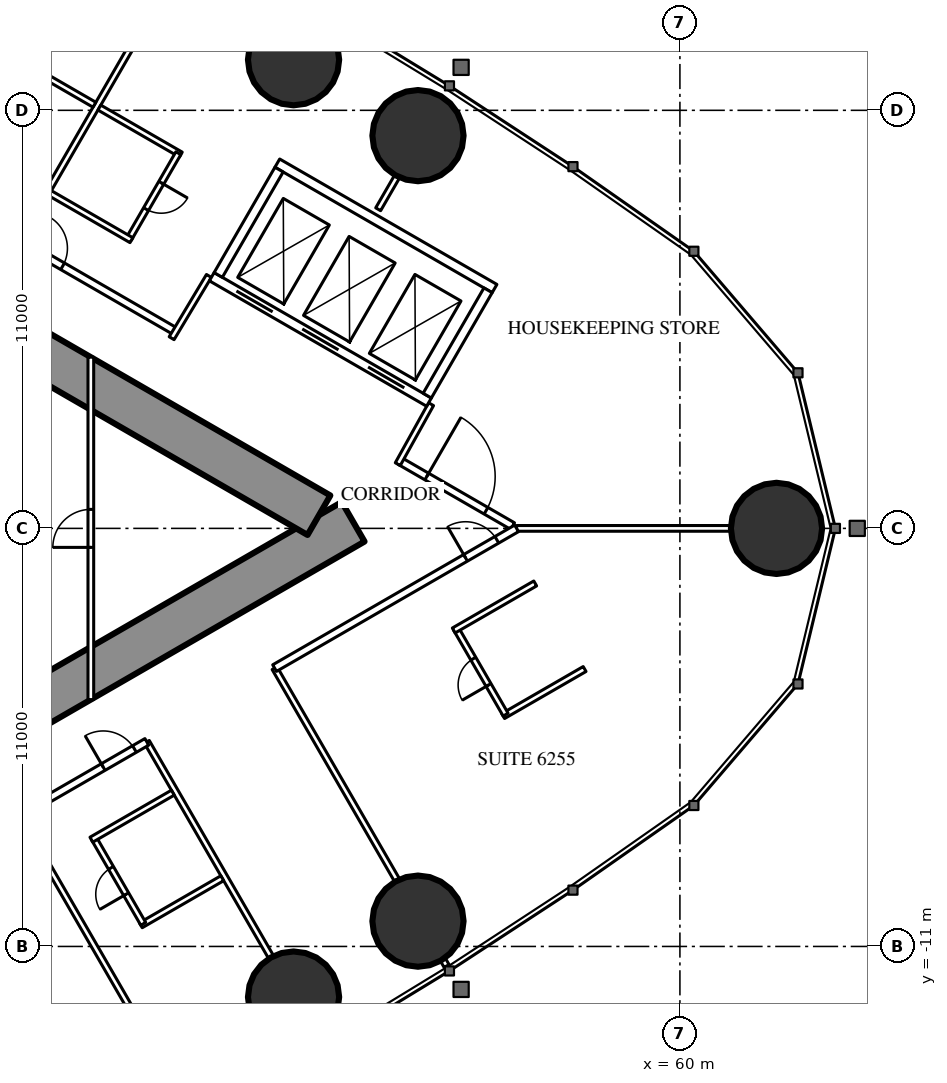
"""IFC4 building model, lengths in metres.
Left out: names, types, materials, properties, quantities, classifications, styles, units other than length and angle.
Written with IfcOpenShell. Run it as: python <this file> out.ifc"""

import sys

from ifc_helpers import new_model, si_unit, direction, frame, frame_2d, origin, origin_2d, place, context, subcontext, project, spatial, rectangle, circle, extrude, element, fill, save


model = new_model("IFC4")
c1 = context("Model", 3, precision=1e-05, world=origin(), true_north=direction((0.0, 1.0)))
c2 = subcontext(c1, "Body", "Model", "MODEL_VIEW")
j1 = project(units=[si_unit("LENGTHUNIT", "METRE"), si_unit("PLANEANGLEUNIT", "RADIAN")], contexts=[c1])
p1 = place(None, origin())
s1 = spatial("IfcSite", under=j1, at=p1, CompositionType="ELEMENT")
p2 = place(p1, origin())
s2 = spatial("IfcBuilding", under=s1, at=p2, CompositionType="ELEMENT")
p3 = place(p2, frame((0.0, 0.0, 233.3)))
s3 = spatial("IfcBuildingStorey", under=s2, at=p3, CompositionType="ELEMENT", Elevation=233.3)
for number, where, z_axis, x_axis in (
    (1, (62.542, 0.0, 0.0), (0.0, 0.0, 1.0), (1.0, 0.0, 0.0)),
    (2, (53.108, 10.334, 0.0), (0.0, 0.0, 1.0), (1.0, 0.0, 0.0)),
    (3, (49.834, 12.332, 0.0), (0.0, 0.0, 1.0), (1.0, 0.0, 0.0)),
    (4, (49.834, -12.332, 0.0), (0.0, 0.0, 1.0), (1.0, 0.0, 0.0)),
    (5, (53.108, -10.334, 0.0), (0.0, 0.0, 1.0), (1.0, 0.0, 0.0)),
):
    element("IfcColumn", number, at=place(p3, frame(where, z_axis=z_axis, x_axis=x_axis)), inside=s3, PredefinedType="COLUMN", context=c2, shape_type="SweptSolid", body=[
        extrude(circle(Radius=1.2, at=origin_2d()), origin(), (0.0, 0.0, 1.0), 3.6),
    ])
p4 = place(p3, frame((27.2, -13.8, 0.0), z_axis=(0.0, 0.0, 1.0), x_axis=(0.866027159892, 0.499996958321, 0.0)))
e6 = element("IfcWall", 6, at=p4, inside=s3, PredefinedType="SHEAR", context=c2, shape_type="SweptSolid", body=[
    extrude(rectangle(XDim=27.947, YDim=1.2, at=frame_2d((13.973, 0.0))), origin(), (0.0, 0.0, 1.0), 3.6),
])
p5 = place(p4, frame((4.6, 0.0, 0.0)))
e7 = element("IfcOpeningElement", 7, at=p5, cuts=e6, PredefinedType="OPENING", context=c2, shape_type="SweptSolid", body=[
    extrude(rectangle(XDim=1.0, YDim=2.2, at=frame_2d((0.5, 1.1))), frame((0.0, 0.61, 0.0), z_axis=(0.0, -1.0, 0.0), x_axis=(1.0, 0.0, 0.0)), (0.0, 0.0, 1.0), 1.22),
])
p6 = place(p4, frame((13.395, 0.0, 0.0)))
e8 = element("IfcOpeningElement", 8, at=p6, cuts=e6, PredefinedType="OPENING", context=c2, shape_type="SweptSolid", body=[
    extrude(rectangle(XDim=1.8, YDim=2.2, at=frame_2d((0.9, 1.1))), frame((0.0, 0.61, 0.0), z_axis=(0.0, -1.0, 0.0), x_axis=(1.0, 0.0, 0.0)), (0.0, 0.0, 1.0), 1.22),
])
p7 = place(p3, frame((27.2, 13.8, 0.0), z_axis=(0.0, 0.0, 1.0), x_axis=(0.866024515034, -0.500001539357, 0.0)))
e9 = element("IfcWall", 9, at=p7, inside=s3, PredefinedType="SHEAR", context=c2, shape_type="SweptSolid", body=[
    extrude(rectangle(XDim=26.907, YDim=1.2, at=frame_2d((13.454, 0.0))), origin(), (0.0, 0.0, 1.0), 3.6),
])
p8 = place(p7, frame((4.6, 0.0, 0.0)))
e10 = element("IfcOpeningElement", 10, at=p8, cuts=e9, PredefinedType="OPENING", context=c2, shape_type="SweptSolid", body=[
    extrude(rectangle(XDim=1.0, YDim=2.2, at=frame_2d((0.5, 1.1))), frame((0.0, 0.61, 0.0), z_axis=(0.0, -1.0, 0.0), x_axis=(1.0, 0.0, 0.0)), (0.0, 0.0, 1.0), 1.22),
])
p9 = place(p7, frame((13.395, 0.0, 0.0)))
e11 = element("IfcOpeningElement", 11, at=p9, cuts=e9, PredefinedType="OPENING", context=c2, shape_type="SweptSolid", body=[
    extrude(rectangle(XDim=1.8, YDim=2.2, at=frame_2d((0.9, 1.1))), frame((0.0, 0.61, 0.0), z_axis=(0.0, -1.0, 0.0), x_axis=(1.0, 0.0, 0.0)), (0.0, 0.0, 1.0), 1.22),
])
p10 = place(p3, frame((42.66, -7.646, 0.0), z_axis=(0.0, 0.0, 1.0), x_axis=(0.499996592859, -0.866027370889, 0.0)))
e12 = element("IfcWall", 12, at=p10, inside=s3, PredefinedType="PARTITIONING", context=c2, shape_type="SweptSolid", body=[
    extrude(rectangle(XDim=6.398, YDim=0.15, at=frame_2d((3.199, 0.0))), origin(), (0.0, 0.0, 1.0), 2.45),
])
p11 = place(p3, frame((45.973, -5.617, 0.0), z_axis=(0.0, 0.0, 1.0), x_axis=(0.499985856986, -0.866033569104, 0.0)))
e13 = element("IfcWall", 13, at=p11, inside=s3, PredefinedType="PARTITIONING", context=c2, shape_type="SweptSolid", body=[
    extrude(rectangle(XDim=6.526, YDim=0.15, at=frame_2d((3.263, 0.0))), origin(), (0.0, 0.0, 1.0), 2.45),
])
p12 = place(p3, frame((49.335, -3.676, 0.0), z_axis=(0.0, 0.0, 1.0), x_axis=(0.500000613642, -0.866025049498, 0.0)))
e14 = element("IfcWall", 14, at=p12, inside=s3, PredefinedType="PARTITIONING", context=c2, shape_type="SweptSolid", body=[
    extrude(rectangle(XDim=6.433, YDim=0.15, at=frame_2d((3.216, 0.0))), origin(), (0.0, 0.0, 1.0), 2.45),
])
p13 = place(p3, frame((53.771, -11.36, 0.0), z_axis=(0.0, 0.0, 1.0), x_axis=(0.499524978789, -0.866299483762, 0.0)))
e15 = element("IfcWall", 15, at=p13, inside=s3, PredefinedType="PARTITIONING", context=c2, shape_type="SweptSolid", body=[
    extrude(rectangle(XDim=0.178, YDim=0.15, at=frame_2d((0.089, 0.0))), origin(), (0.0, 0.0, 1.0), 2.45),
])
p14 = place(p3, frame((42.66, 7.646, 0.0), z_axis=(0.0, 0.0, 1.0), x_axis=(0.499996592859, 0.866027370889, 0.0)))
e16 = element("IfcWall", 16, at=p14, inside=s3, PredefinedType="PARTITIONING", context=c2, shape_type="SweptSolid", body=[
    extrude(rectangle(XDim=6.398, YDim=0.15, at=frame_2d((3.199, 0.0))), origin(), (0.0, 0.0, 1.0), 2.45),
])
p15 = place(p3, frame((55.702, 0.0, 0.0), z_axis=(0.0, 0.0, 1.0), x_axis=(1.0, 0.0, 0.0)))
e17 = element("IfcWall", 17, at=p15, inside=s3, PredefinedType="PARTITIONING", context=c2, shape_type="SweptSolid", body=[
    extrude(rectangle(XDim=5.619, YDim=0.15, at=frame_2d((2.81, 0.0))), origin(), (0.0, 0.0, 1.0), 2.45),
])
p16 = place(p3, frame((52.06, 8.396, 0.0), z_axis=(0.0, 0.0, 1.0), x_axis=(0.500095379624, 0.865970329329, 0.0)))
e18 = element("IfcWall", 18, at=p16, inside=s3, PredefinedType="PARTITIONING", context=c2, shape_type="SweptSolid", body=[
    extrude(rectangle(XDim=0.982, YDim=0.15, at=frame_2d((0.491, 0.0))), origin(), (0.0, 0.0, 1.0), 3.35),
])
p17 = place(p3, frame((28.959, 15.44, 0.0), z_axis=(0.0, 0.0, 1.0), x_axis=(0.866028936079, -0.499993881836, 0.0)))
e19 = element("IfcWall", 19, at=p17, inside=s3, PredefinedType="PARTITIONING", context=c2, shape_type="SweptSolid", body=[
    extrude(rectangle(XDim=20.503, YDim=0.2, at=frame_2d((10.251, 0.0))), origin(), (0.0, 0.0, 1.0), 3.35),
])
p18 = place(p17, frame((16.137, 0.0, 0.0)))
e20 = element("IfcOpeningElement", 20, at=p18, cuts=e19, PredefinedType="OPENING", context=c2, shape_type="SweptSolid", body=[
    extrude(rectangle(XDim=0.95, YDim=2.2, at=frame_2d((0.475, 1.1))), frame((0.0, 0.11, 0.0), z_axis=(0.0, -1.0, 0.0), x_axis=(1.0, 0.0, 0.0)), (0.0, 0.0, 1.0), 0.22),
])
p19 = place(p17, frame((14.437, 0.0, 0.0)))
e21 = element("IfcOpeningElement", 21, at=p19, cuts=e19, PredefinedType="OPENING", context=c2, shape_type="SweptSolid", body=[
    extrude(rectangle(XDim=0.95, YDim=2.2, at=frame_2d((0.475, 1.1))), frame((0.0, 0.11, 0.0), z_axis=(0.0, -1.0, 0.0), x_axis=(1.0, 0.0, 0.0)), (0.0, 0.0, 1.0), 0.22),
])
p20 = place(p17, frame((2.244, 0.0, 0.0)))
e22 = element("IfcOpeningElement", 22, at=p20, cuts=e19, PredefinedType="OPENING", context=c2, shape_type="SweptSolid", body=[
    extrude(rectangle(XDim=1.8, YDim=2.03, at=frame_2d((0.9, 1.015))), frame((0.0, 0.11, 0.0), z_axis=(0.0, -1.0, 0.0), x_axis=(1.0, 0.0, 0.0)), (0.0, 0.0, 1.0), 0.22),
])
p21 = place(p3, frame((52.639, 1.769, 0.0), z_axis=(0.0, 0.0, 1.0), x_axis=(0.866027340901, -0.4999966448, 0.0)))
e23 = element("IfcWall", 23, at=p21, inside=s3, PredefinedType="PARTITIONING", context=c2, shape_type="SweptSolid", body=[
    extrude(rectangle(XDim=3.417, YDim=0.2, at=frame_2d((1.708, 0.0))), origin(), (0.0, 0.0, 1.0), 3.35),
])
p22 = place(p21, frame((0.809, 0.0, 0.0)))
e24 = element("IfcOpeningElement", 24, at=p22, cuts=e23, PredefinedType="OPENING", context=c2, shape_type="SweptSolid", body=[
    extrude(rectangle(XDim=1.8, YDim=2.2, at=frame_2d((0.9, 1.1))), frame((0.0, 0.11, 0.0), z_axis=(0.0, -1.0, 0.0), x_axis=(1.0, 0.0, 0.0)), (0.0, 0.0, 1.0), 0.22),
])
p23 = place(p3, frame((47.606, 6.642, 0.0), z_axis=(0.0, 0.0, 1.0), x_axis=(-0.51353662755, -0.858067673418, 0.0)))
e25 = element("IfcWall", 25, at=p23, inside=s3, PredefinedType="PARTITIONING", context=c2, shape_type="SweptSolid", body=[
    extrude(rectangle(XDim=1.91, YDim=0.15, at=frame_2d((0.955, 0.0))), origin(), (0.0, 0.0, 1.0), 3.35),
])
p24 = place(p3, frame((52.576, 1.689, 0.0), z_axis=(0.0, 0.0, 1.0), x_axis=(0.485424724123, 0.874278466629, 0.0)))
e26 = element("IfcWall", 26, at=p24, inside=s3, PredefinedType="PARTITIONING", context=c2, shape_type="SweptSolid", body=[
    extrude(rectangle(XDim=1.805, YDim=0.15, at=frame_2d((0.903, 0.0))), origin(), (0.0, 0.0, 1.0), 3.35),
])
p25 = place(p3, frame((45.814, -10.443, 0.0), z_axis=(0.0, 0.0, 1.0), x_axis=(0.866073894602, 0.499916002032, 0.0)))
e27 = element("IfcWall", 27, at=p25, inside=s3, PredefinedType="PARTITIONING", context=c2, shape_type="SweptSolid", body=[
    extrude(rectangle(XDim=2.475, YDim=0.15, at=frame_2d((1.238, 0.0))), origin(), (0.0, 0.0, 1.0), 3.35),
])
p26 = place(p3, frame((44.579, -8.154, 0.0), z_axis=(0.0, 0.0, 1.0), x_axis=(0.500006934395, -0.866021400173, 0.0)))
e28 = element("IfcWall", 28, at=p26, inside=s3, PredefinedType="PARTITIONING", context=c2, shape_type="SweptSolid", body=[
    extrude(rectangle(XDim=2.6, YDim=0.15, at=frame_2d((1.3, 0.0))), origin(), (0.0, 0.0, 1.0), 3.35),
])
p27 = place(p26, frame((0.9, 0.0, 0.0)))
e29 = element("IfcOpeningElement", 29, at=p27, cuts=e28, PredefinedType="OPENING", context=c2, shape_type="SweptSolid", body=[
    extrude(rectangle(XDim=0.8, YDim=2.2, at=frame_2d((0.4, 1.1))), frame((0.0, 0.085, 0.0), z_axis=(0.0, -1.0, 0.0), x_axis=(1.0, 0.0, 0.0)), (0.0, 0.0, 1.0), 0.17),
])
p28 = place(p3, frame((44.514, -8.191, 0.0), z_axis=(0.0, 0.0, 1.0), x_axis=(0.866031185235, 0.4999899861, 0.0)))
e30 = element("IfcWall", 30, at=p28, inside=s3, PredefinedType="PARTITIONING", context=c2, shape_type="SweptSolid", body=[
    extrude(rectangle(XDim=2.475, YDim=0.15, at=frame_2d((1.238, 0.0))), origin(), (0.0, 0.0, 1.0), 3.35),
])
p29 = place(p3, frame((55.349, -4.938, 0.0), z_axis=(0.0, 0.0, 1.0), x_axis=(0.866006523861, 0.500032699561, 0.0)))
e31 = element("IfcWall", 31, at=p29, inside=s3, PredefinedType="PARTITIONING", context=c2, shape_type="SweptSolid", body=[
    extrude(rectangle(XDim=2.475, YDim=0.15, at=frame_2d((1.237, 0.0))), origin(), (0.0, 0.0, 1.0), 3.35),
])
p30 = place(p3, frame((54.114, -2.649, 0.0), z_axis=(0.0, 0.0, 1.0), x_axis=(0.500006934395, -0.866021400173, 0.0)))
e32 = element("IfcWall", 32, at=p30, inside=s3, PredefinedType="PARTITIONING", context=c2, shape_type="SweptSolid", body=[
    extrude(rectangle(XDim=2.6, YDim=0.15, at=frame_2d((1.3, 0.0))), origin(), (0.0, 0.0, 1.0), 3.35),
])
p31 = place(p30, frame((0.9, 0.0, 0.0)))
e33 = element("IfcOpeningElement", 33, at=p31, cuts=e32, PredefinedType="OPENING", context=c2, shape_type="SweptSolid", body=[
    extrude(rectangle(XDim=0.8, YDim=2.2, at=frame_2d((0.4, 1.1))), frame((0.0, 0.085, 0.0), z_axis=(0.0, -1.0, 0.0), x_axis=(1.0, 0.0, 0.0)), (0.0, 0.0, 1.0), 0.17),
])
for number, where, z_axis, x_axis in (
    (34, (54.049, -2.687, 0.0), (0.0, 0.0, 1.0), (0.866, 0.5, 0.0)),
    (35, (44.725, 11.072, 0.0), (0.0, 0.0, 1.0), (0.866, -0.5, 0.0)),
):
    element("IfcWall", number, at=place(p3, frame(where, z_axis=z_axis, x_axis=x_axis)), inside=s3, PredefinedType="PARTITIONING", context=c2, shape_type="SweptSolid", body=[
        extrude(rectangle(XDim=2.475, YDim=0.15, at=frame_2d((1.237, 0.0))), origin(), (0.0, 0.0, 1.0), 3.35),
    ])
p32 = place(p3, frame((45.503, 7.621, 0.0), z_axis=(0.0, 0.0, 1.0), x_axis=(0.500006934395, 0.866021400173, 0.0)))
e36 = element("IfcWall", 36, at=p32, inside=s3, PredefinedType="PARTITIONING", context=c2, shape_type="SweptSolid", body=[
    extrude(rectangle(XDim=2.6, YDim=0.15, at=frame_2d((1.3, 0.0))), origin(), (0.0, 0.0, 1.0), 3.35),
])
p33 = place(p32, frame((0.9, 0.0, 0.0)))
e37 = element("IfcOpeningElement", 37, at=p33, cuts=e36, PredefinedType="OPENING", context=c2, shape_type="SweptSolid", body=[
    extrude(rectangle(XDim=0.8, YDim=2.2, at=frame_2d((0.4, 1.1))), frame((0.0, 0.085, 0.0), z_axis=(0.0, -1.0, 0.0), x_axis=(1.0, 0.0, 0.0)), (0.0, 0.0, 1.0), 0.17),
])
p34 = place(p3, frame((43.425, 8.821, 0.0), z_axis=(0.0, 0.0, 1.0), x_axis=(0.866006523861, -0.500032699561, 0.0)))
e38 = element("IfcWall", 38, at=p34, inside=s3, PredefinedType="PARTITIONING", context=c2, shape_type="SweptSolid", body=[
    extrude(rectangle(XDim=2.475, YDim=0.15, at=frame_2d((1.237, 0.0))), origin(), (0.0, 0.0, 1.0), 2.5),
])
p35 = place(p3, frame((42.451, 12.385, 0.0), z_axis=(0.0, 0.0, 1.0), x_axis=(0.866031185235, -0.4999899861, 0.0)))
e39 = element("IfcWall", 39, at=p35, inside=s3, PredefinedType="PARTITIONING", context=c2, shape_type="SweptSolid", body=[
    extrude(rectangle(XDim=2.475, YDim=0.15, at=frame_2d((1.238, 0.0))), origin(), (0.0, 0.0, 1.0), 3.35),
])
p36 = place(p3, frame((28.959, -15.44, 0.0), z_axis=(0.0, 0.0, 1.0), x_axis=(0.866025204199, 0.500000345692, 0.0)))
e40 = element("IfcWall", 40, at=p36, inside=s3, PredefinedType="PARTITIONING", context=c2, shape_type="SweptSolid", body=[
    extrude(rectangle(XDim=19.646, YDim=0.2, at=frame_2d((9.823, 0.0))), origin(), (0.0, 0.0, 1.0), 3.35),
])
p37 = place(p36, frame((1.494, 0.0, 0.0)))
e41 = element("IfcOpeningElement", 41, at=p37, cuts=e40, PredefinedType="OPENING", context=c2, shape_type="SweptSolid", body=[
    extrude(rectangle(XDim=1.8, YDim=2.03, at=frame_2d((0.9, 1.015))), frame((0.0, 0.11, 0.0), z_axis=(0.0, -1.0, 0.0), x_axis=(1.0, 0.0, 0.0)), (0.0, 0.0, 1.0), 0.22),
])
p38 = place(p36, frame((7.687, 0.0, 0.0)))
e42 = element("IfcOpeningElement", 42, at=p38, cuts=e40, PredefinedType="OPENING", context=c2, shape_type="SweptSolid", body=[
    extrude(rectangle(XDim=1.0, YDim=2.2, at=frame_2d((0.5, 1.1))), frame((0.0, 0.11, 0.0), z_axis=(0.0, -1.0, 0.0), x_axis=(1.0, 0.0, 0.0)), (0.0, 0.0, 1.0), 0.22),
])
p39 = place(p36, frame((18.321, 0.0, 0.0)))
e43 = element("IfcOpeningElement", 43, at=p39, cuts=e40, PredefinedType="OPENING", context=c2, shape_type="SweptSolid", body=[
    extrude(rectangle(XDim=0.95, YDim=2.2, at=frame_2d((0.475, 1.1))), frame((0.0, 0.11, 0.0), z_axis=(0.0, -1.0, 0.0), x_axis=(1.0, 0.0, 0.0)), (0.0, 0.0, 1.0), 0.22),
])
p40 = place(p3, frame((49.335, -3.676, 0.0), z_axis=(0.0, 0.0, 1.0), x_axis=(0.866021344046, 0.500007031608, 0.0)))
e44 = element("IfcWall", 44, at=p40, inside=s3, PredefinedType="PARTITIONING", context=c2, shape_type="SweptSolid", body=[
    extrude(rectangle(XDim=7.352, YDim=0.2, at=frame_2d((3.676, 0.0))), origin(), (0.0, 0.0, 1.0), 3.35),
])
p41 = place(p40, frame((5.802, 0.0, 0.0)))
e45 = element("IfcOpeningElement", 45, at=p41, cuts=e44, PredefinedType="OPENING", context=c2, shape_type="SweptSolid", body=[
    extrude(rectangle(XDim=0.95, YDim=2.2, at=frame_2d((0.475, 1.1))), frame((0.0, 0.11, 0.0), z_axis=(0.0, -1.0, 0.0), x_axis=(1.0, 0.0, 0.0)), (0.0, 0.0, 1.0), 0.22),
])
p42 = place(p3, frame((44.5, -4.505, 0.0), z_axis=(0.0, 0.0, 1.0), x_axis=(0.0, 1.0, 0.0)))
e46 = element("IfcWall", 46, at=p42, inside=s3, PredefinedType="PARTITIONING", context=c2, shape_type="SweptSolid", body=[
    extrude(rectangle(XDim=9.009, YDim=0.15, at=frame_2d((4.505, 0.0))), origin(), (0.0, 0.0, 1.0), 3.35),
])
p43 = place(p42, frame((4.005, 0.0, 0.0)))
e47 = element("IfcOpeningElement", 47, at=p43, cuts=e46, PredefinedType="OPENING", context=c2, shape_type="SweptSolid", body=[
    extrude(rectangle(XDim=1.0, YDim=2.2, at=frame_2d((0.5, 1.1))), frame((0.0, 0.085, 0.0), z_axis=(0.0, -1.0, 0.0), x_axis=(1.0, 0.0, 0.0)), (0.0, 0.0, 1.0), 0.17),
])
p44 = place(p3, frame((47.681, 6.622, 0.0), z_axis=(0.0, 0.0, 1.0), x_axis=(0.86603344179, -0.499986077507, 0.0)))
e48 = element("IfcWall", 48, at=p44, inside=s3, PredefinedType="PARTITIONING", context=c2, shape_type="SweptSolid", body=[
    extrude(rectangle(XDim=6.6, YDim=0.25, at=frame_2d((3.3, 0.0))), origin(), (0.0, 0.0, 1.0), 3.35),
])
p45 = place(p44, frame((0.75, 0.0, 0.0)))
e49 = element("IfcOpeningElement", 49, at=p45, cuts=e48, PredefinedType="OPENING", context=c2, shape_type="SweptSolid", body=[
    extrude(rectangle(XDim=1.1, YDim=2.2, at=frame_2d((0.55, 1.1))), frame((0.0, 0.135, 0.0), z_axis=(0.0, -1.0, 0.0), x_axis=(1.0, 0.0, 0.0)), (0.0, 0.0, 1.0), 0.27),
])
p46 = place(p44, frame((2.75, 0.0, 0.0)))
e50 = element("IfcOpeningElement", 50, at=p46, cuts=e48, PredefinedType="OPENING", context=c2, shape_type="SweptSolid", body=[
    extrude(rectangle(XDim=1.1, YDim=2.2, at=frame_2d((0.55, 1.1))), frame((0.0, 0.135, 0.0), z_axis=(0.0, -1.0, 0.0), x_axis=(1.0, 0.0, 0.0)), (0.0, 0.0, 1.0), 0.27),
])
p47 = place(p44, frame((4.75, 0.0, 0.0)))
e51 = element("IfcOpeningElement", 51, at=p47, cuts=e48, PredefinedType="OPENING", context=c2, shape_type="SweptSolid", body=[
    extrude(rectangle(XDim=1.1, YDim=2.2, at=frame_2d((0.55, 1.1))), frame((0.0, 0.135, 0.0), z_axis=(0.0, -1.0, 0.0), x_axis=(1.0, 0.0, 0.0)), (0.0, 0.0, 1.0), 0.27),
])
p48 = place(p3, frame((49.406, 9.611, 0.0), z_axis=(0.0, 0.0, 1.0), x_axis=(0.86603344179, -0.499986077507, 0.0)))
e52 = element("IfcWall", 52, at=p48, inside=s3, PredefinedType="PARTITIONING", context=c2, shape_type="SweptSolid", body=[
    extrude(rectangle(XDim=6.6, YDim=0.25, at=frame_2d((3.3, 0.0))), origin(), (0.0, 0.0, 1.0), 3.35),
])
p49 = place(p3, frame((47.852, 6.668, 0.0), z_axis=(0.0, 0.0, 1.0), x_axis=(0.499929347863, 0.866066190972, 0.0)))
e53 = element("IfcWall", 53, at=p49, inside=s3, PredefinedType="PARTITIONING", context=c2, shape_type="SweptSolid", body=[
    extrude(rectangle(XDim=3.201, YDim=0.25, at=frame_2d((1.6, 0.0))), origin(), (0.0, 0.0, 1.0), 3.35),
])
p50 = place(p3, frame((53.352, 3.493, 0.0), z_axis=(0.0, 0.0, 1.0), x_axis=(0.499872130319, 0.866099216793, 0.0)))
e54 = element("IfcWall", 54, at=p50, inside=s3, PredefinedType="PARTITIONING", context=c2, shape_type="SweptSolid", body=[
    extrude(rectangle(XDim=3.2, YDim=0.25, at=frame_2d((1.6, 0.0))), origin(), (0.0, 0.0, 1.0), 3.35),
])
p51 = place(p27, origin())
e55 = element("IfcDoor", 55, at=p51, inside=s3, OperationType="SINGLE_SWING_RIGHT", PredefinedType="DOOR", context=c2, shape_type="SweptSolid", body=[
    extrude(rectangle(XDim=0.8, YDim=2.2, at=frame_2d((0.4, 1.1))), frame((0.0, 0.025, 0.0), z_axis=(0.0, -1.0, 0.0), x_axis=(1.0, 0.0, 0.0)), (0.0, 0.0, 1.0), 0.05),
])
fill(e29, e55)
p52 = place(p39, origin())
e56 = element("IfcDoor", 56, at=p52, inside=s3, OperationType="SINGLE_SWING_LEFT", PredefinedType="DOOR", context=c2, shape_type="SweptSolid", body=[
    extrude(rectangle(XDim=0.95, YDim=2.2, at=frame_2d((0.475, 1.1))), frame((0.0, 0.025, 0.0), z_axis=(0.0, -1.0, 0.0), x_axis=(1.0, 0.0, 0.0)), (0.0, 0.0, 1.0), 0.05),
])
fill(e43, e56)
p53 = place(p31, origin())
e57 = element("IfcDoor", 57, at=p53, inside=s3, OperationType="SINGLE_SWING_RIGHT", PredefinedType="DOOR", context=c2, shape_type="SweptSolid", body=[
    extrude(rectangle(XDim=0.8, YDim=2.2, at=frame_2d((0.4, 1.1))), frame((0.0, 0.025, 0.0), z_axis=(0.0, -1.0, 0.0), x_axis=(1.0, 0.0, 0.0)), (0.0, 0.0, 1.0), 0.05),
])
fill(e33, e57)
p54 = place(p41, origin())
e58 = element("IfcDoor", 58, at=p54, inside=s3, OperationType="SINGLE_SWING_LEFT", PredefinedType="DOOR", context=c2, shape_type="SweptSolid", body=[
    extrude(rectangle(XDim=0.95, YDim=2.2, at=frame_2d((0.475, 1.1))), frame((0.0, 0.025, 0.0), z_axis=(0.0, -1.0, 0.0), x_axis=(1.0, 0.0, 0.0)), (0.0, 0.0, 1.0), 0.05),
])
fill(e45, e58)
p55 = place(p33, origin())
e59 = element("IfcDoor", 59, at=p55, inside=s3, OperationType="SINGLE_SWING_RIGHT", PredefinedType="DOOR", context=c2, shape_type="SweptSolid", body=[
    extrude(rectangle(XDim=0.8, YDim=2.2, at=frame_2d((0.4, 1.1))), frame((0.0, 0.025, 0.0), z_axis=(0.0, -1.0, 0.0), x_axis=(1.0, 0.0, 0.0)), (0.0, 0.0, 1.0), 0.05),
])
fill(e37, e59)
p56 = place(p18, origin())
e60 = element("IfcDoor", 60, at=p56, inside=s3, OperationType="SINGLE_SWING_LEFT", PredefinedType="DOOR", context=c2, shape_type="SweptSolid", body=[
    extrude(rectangle(XDim=0.95, YDim=2.2, at=frame_2d((0.475, 1.1))), frame((0.0, 0.025, 0.0), z_axis=(0.0, -1.0, 0.0), x_axis=(1.0, 0.0, 0.0)), (0.0, 0.0, 1.0), 0.05),
])
fill(e20, e60)
p57 = place(p22, origin())
e61 = element("IfcDoor", 61, at=p57, inside=s3, OperationType="DOUBLE_DOOR_SINGLE_SWING", PredefinedType="DOOR", context=c2, shape_type="SweptSolid", body=[
    extrude(rectangle(XDim=1.8, YDim=2.2, at=frame_2d((0.9, 1.1))), frame((0.0, 0.025, 0.0), z_axis=(0.0, -1.0, 0.0), x_axis=(1.0, 0.0, 0.0)), (0.0, 0.0, 1.0), 0.05),
])
fill(e24, e61)
p58 = place(p43, origin())
e62 = element("IfcDoor", 62, at=p58, inside=s3, OperationType="SINGLE_SWING_LEFT", PredefinedType="DOOR", context=c2, shape_type="SweptSolid", body=[
    extrude(rectangle(XDim=1.0, YDim=2.2, at=frame_2d((0.5, 1.1))), frame((0.0, 0.025, 0.0), z_axis=(0.0, -1.0, 0.0), x_axis=(1.0, 0.0, 0.0)), (0.0, 0.0, 1.0), 0.05),
])
fill(e47, e62)
p59 = place(p45, origin())
e63 = element("IfcDoor", 63, at=p59, inside=s3, OperationType="DOUBLE_DOOR_SLIDING", PredefinedType="USERDEFINED", context=c2, shape_type="SweptSolid", body=[
    extrude(rectangle(XDim=1.1, YDim=2.2, at=frame_2d((0.55, 1.1))), frame((0.0, 0.025, 0.0), z_axis=(0.0, -1.0, 0.0), x_axis=(1.0, 0.0, 0.0)), (0.0, 0.0, 1.0), 0.05),
])
fill(e49, e63)
p60 = place(p46, origin())
e64 = element("IfcDoor", 64, at=p60, inside=s3, OperationType="DOUBLE_DOOR_SLIDING", PredefinedType="USERDEFINED", context=c2, shape_type="SweptSolid", body=[
    extrude(rectangle(XDim=1.1, YDim=2.2, at=frame_2d((0.55, 1.1))), frame((0.0, 0.025, 0.0), z_axis=(0.0, -1.0, 0.0), x_axis=(1.0, 0.0, 0.0)), (0.0, 0.0, 1.0), 0.05),
])
fill(e50, e64)
p61 = place(p47, origin())
e65 = element("IfcDoor", 65, at=p61, inside=s3, OperationType="DOUBLE_DOOR_SLIDING", PredefinedType="USERDEFINED", context=c2, shape_type="SweptSolid", body=[
    extrude(rectangle(XDim=1.1, YDim=2.2, at=frame_2d((0.55, 1.1))), frame((0.0, 0.025, 0.0), z_axis=(0.0, -1.0, 0.0), x_axis=(1.0, 0.0, 0.0)), (0.0, 0.0, 1.0), 0.05),
])
fill(e51, e65)
save(model, sys.argv[1])
